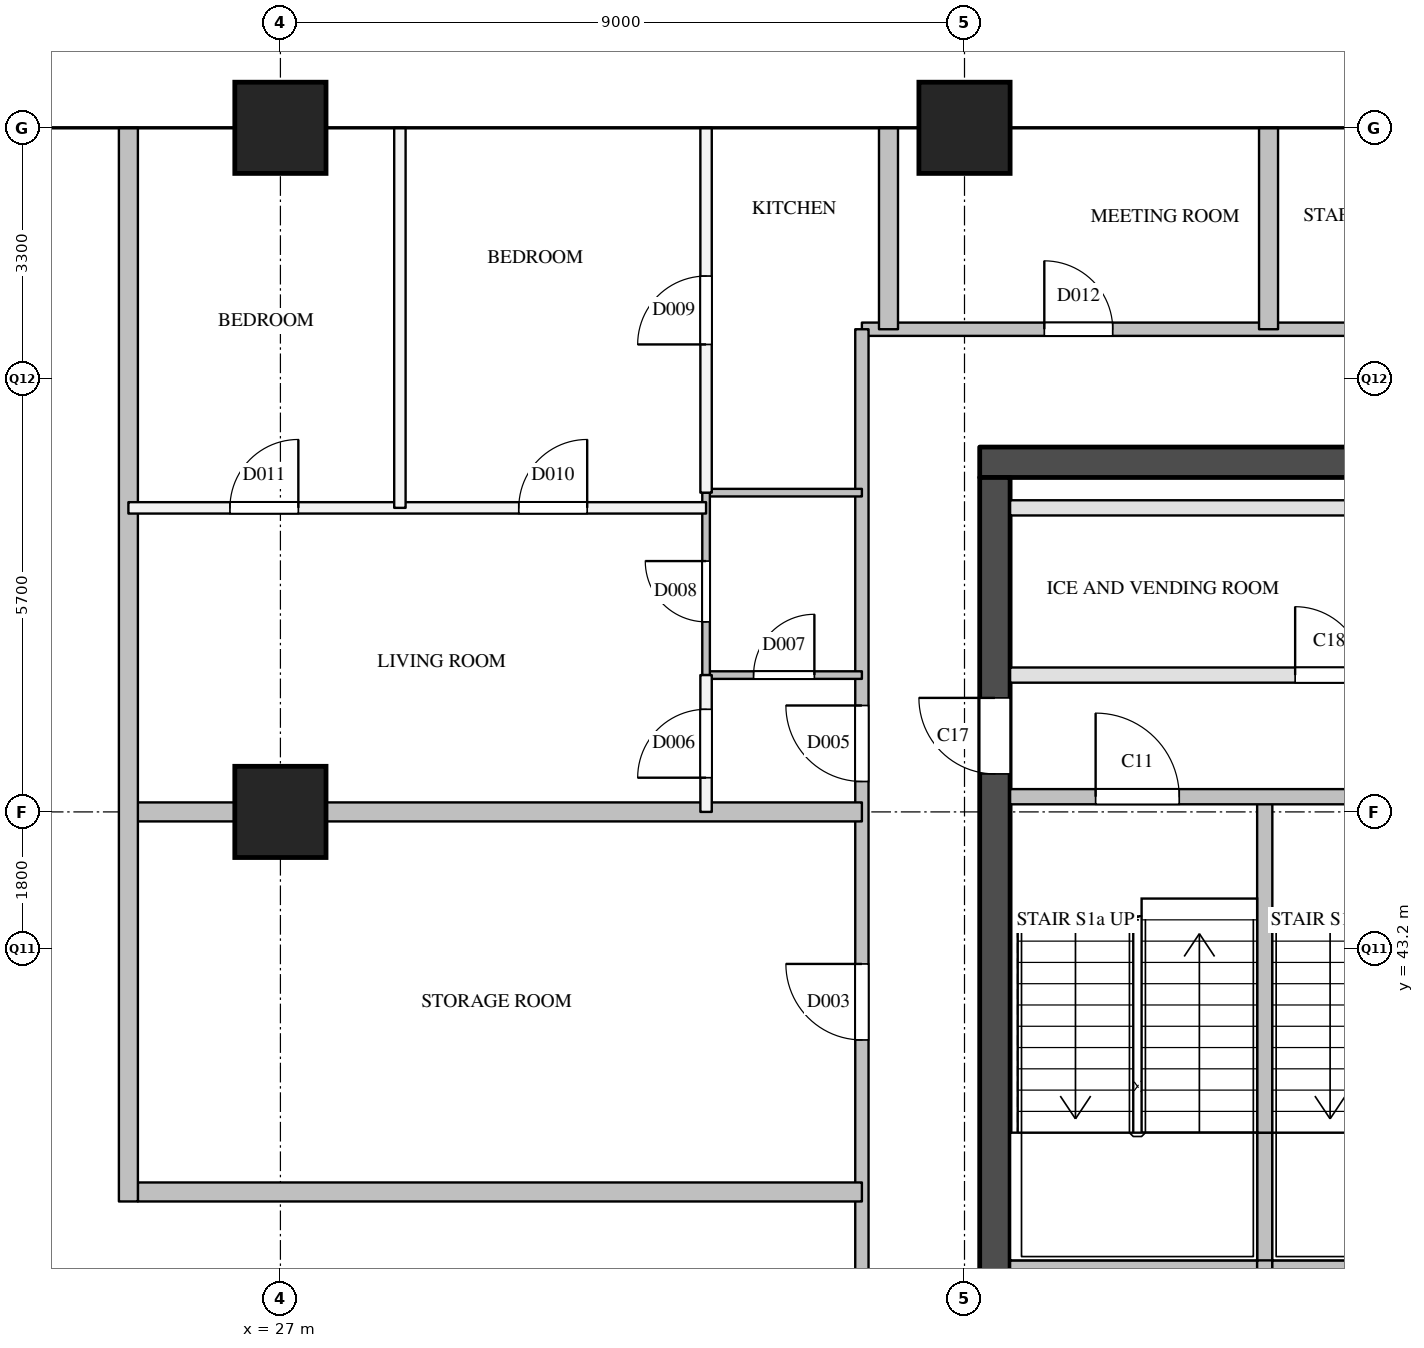
"""IFC4 building model, lengths in metres.
Left out: names, types, materials, properties, quantities, classifications, styles, units other than length and angle.
Written with IfcOpenShell. Run it as: python <this file> out.ifc"""

import sys

from ifc_helpers import new_model, si_unit, direction, frame, frame_2d, origin, origin_2d, place, context, subcontext, project, spatial, rectangle, extrude, element, fill, save


model = new_model("IFC4")
c1 = context("Model", 3, precision=1e-05, world=origin(), true_north=direction((0.0, 1.0)))
c2 = subcontext(c1, "Body", "Model", "MODEL_VIEW")
j1 = project(units=[si_unit("LENGTHUNIT", "METRE"), si_unit("PLANEANGLEUNIT", "RADIAN")], contexts=[c1])
p1 = place(None, origin())
s1 = spatial("IfcSite", under=j1, at=p1, CompositionType="ELEMENT")
p2 = place(p1, origin())
s2 = spatial("IfcBuilding", under=s1, at=p2, CompositionType="ELEMENT")
p3 = place(p2, frame((0.0, 0.0, 265.7)))
s3 = spatial("IfcBuildingStorey", under=s2, at=p3, CompositionType="ELEMENT", Elevation=265.7)
for number, where, z_axis, x_axis in (
    (1, (27.0, 45.0, 0.0), (0.0, 0.0, 1.0), (1.0, 0.0, 0.0)),
    (2, (27.0, 54.0, 0.0), (0.0, 0.0, 1.0), (1.0, 0.0, 0.0)),
    (3, (36.0, 54.0, 0.0), (0.0, 0.0, 1.0), (1.0, 0.0, 0.0)),
):
    element("IfcColumn", number, at=place(p3, frame(where, z_axis=z_axis, x_axis=x_axis)), inside=s3, PredefinedType="COLUMN", context=c2, shape_type="SweptSolid", body=[
        extrude(rectangle(XDim=1.2, YDim=1.2, at=origin_2d()), origin(), (0.0, 0.0, 1.0), 3.9),
    ])
p4 = place(p3, frame((36.2, 49.6, 0.0), z_axis=(0.0, 0.0, 1.0), x_axis=(1.0, 0.0, 0.0)))
e4 = element("IfcWall", 4, at=p4, inside=s3, PredefinedType="SHEAR", context=c2, shape_type="SweptSolid", body=[
    extrude(rectangle(XDim=12.0, YDim=0.4, at=frame_2d((6.0, 0.0))), origin(), (0.0, 0.0, 1.0), 3.6),
])
p5 = place(p3, frame((36.4, 29.1, 0.0), z_axis=(0.0, 0.0, 1.0), x_axis=(0.0, 1.0, 0.0)))
e5 = element("IfcWall", 5, at=p5, inside=s3, PredefinedType="SHEAR", context=c2, shape_type="SweptSolid", body=[
    extrude(rectangle(XDim=20.3, YDim=0.4, at=frame_2d((10.15, 0.0))), origin(), (0.0, 0.0, 1.0), 3.6),
])
p6 = place(p5, frame((3.6, 0.0, 0.0)))
e6 = element("IfcOpeningElement", 6, at=p6, cuts=e5, PredefinedType="OPENING", context=c2, shape_type="SweptSolid", body=[
    extrude(rectangle(XDim=1.8, YDim=2.1, at=frame_2d((0.9, 1.05))), frame((0.0, 0.21, 0.0), z_axis=(0.0, -1.0, 0.0), x_axis=(1.0, 0.0, 0.0)), (0.0, 0.0, 1.0), 0.42),
])
p7 = place(p5, frame((16.4, 0.0, 0.0)))
e7 = element("IfcOpeningElement", 7, at=p7, cuts=e5, PredefinedType="OPENING", context=c2, shape_type="SweptSolid", body=[
    extrude(rectangle(XDim=1.0, YDim=2.1, at=frame_2d((0.5, 1.05))), frame((0.0, 0.21, 0.0), z_axis=(0.0, -1.0, 0.0), x_axis=(1.0, 0.0, 0.0)), (0.0, 0.0, 1.0), 0.42),
])
p8 = place(p3, frame((39.95, 39.0, 0.0), z_axis=(0.0, 0.0, 1.0), x_axis=(0.0, 1.0, 0.0)))
e8 = element("IfcWall", 8, at=p8, inside=s3, PredefinedType="SOLIDWALL", context=c2, shape_type="SweptSolid", body=[
    extrude(rectangle(XDim=1.78, YDim=0.2, at=frame_2d((0.89, 0.0))), origin(), (0.0, 0.0, 1.0), 3.6),
])
p9 = place(p3, frame((39.95, 40.78, 0.0), z_axis=(0.0, 0.0, 1.0), x_axis=(0.0, 1.0, 0.0)))
e9 = element("IfcWall", 9, at=p9, inside=s3, PredefinedType="SOLIDWALL", context=c2, shape_type="SweptSolid", body=[
    extrude(rectangle(XDim=4.42, YDim=0.2, at=frame_2d((2.21, 0.0))), origin(), (0.0, 0.0, 1.0), 3.6),
])
p10 = place(p3, frame((36.6, 39.0, 0.0), z_axis=(0.0, 0.0, 1.0), x_axis=(1.0, 0.0, 0.0)))
e10 = element("IfcWall", 10, at=p10, inside=s3, PredefinedType="SOLIDWALL", context=c2, shape_type="SweptSolid", body=[
    extrude(rectangle(XDim=3.25, YDim=0.2, at=frame_2d((1.625, 0.0))), origin(), (0.0, 0.0, 1.0), 3.6),
])
p11 = place(p3, frame((39.85, 39.0, 0.0), z_axis=(0.0, 0.0, 1.0), x_axis=(1.0, 0.0, 0.0)))
e11 = element("IfcWall", 11, at=p11, inside=s3, PredefinedType="SOLIDWALL", context=c2, shape_type="SweptSolid", body=[
    extrude(rectangle(XDim=0.2, YDim=0.2, at=frame_2d((0.1, 0.0))), origin(), (0.0, 0.0, 1.0), 3.6),
])
p12 = place(p3, frame((40.05, 39.0, 0.0), z_axis=(0.0, 0.0, 1.0), x_axis=(1.0, 0.0, 0.0)))
e12 = element("IfcWall", 12, at=p12, inside=s3, PredefinedType="SOLIDWALL", context=c2, shape_type="SweptSolid", body=[
    extrude(rectangle(XDim=3.15, YDim=0.2, at=frame_2d((1.575, 0.0))), origin(), (0.0, 0.0, 1.0), 3.6),
])
p13 = place(p3, frame((36.6, 45.2, 0.0), z_axis=(0.0, 0.0, 1.0), x_axis=(1.0, 0.0, 0.0)))
e13 = element("IfcWall", 13, at=p13, inside=s3, PredefinedType="SOLIDWALL", context=c2, shape_type="SweptSolid", body=[
    extrude(rectangle(XDim=10.05, YDim=0.2, at=frame_2d((5.025, 0.0))), origin(), (0.0, 0.0, 1.0), 3.6),
])
p14 = place(p13, frame((1.125, 0.0, 0.0)))
e14 = element("IfcOpeningElement", 14, at=p14, cuts=e13, PredefinedType="OPENING", context=c2, shape_type="SweptSolid", body=[
    extrude(rectangle(XDim=1.1, YDim=2.1, at=frame_2d((0.55, 1.05))), frame((0.0, 0.11, 0.0), z_axis=(0.0, -1.0, 0.0), x_axis=(1.0, 0.0, 0.0)), (0.0, 0.0, 1.0), 0.22),
])
p15 = place(p13, frame((4.475, 0.0, 0.0)))
e15 = element("IfcOpeningElement", 15, at=p15, cuts=e13, PredefinedType="OPENING", context=c2, shape_type="SweptSolid", body=[
    extrude(rectangle(XDim=1.1, YDim=2.1, at=frame_2d((0.55, 1.05))), frame((0.0, 0.11, 0.0), z_axis=(0.0, -1.0, 0.0), x_axis=(1.0, 0.0, 0.0)), (0.0, 0.0, 1.0), 0.22),
])
p16 = place(p13, frame((7.825, 0.0, 0.0)))
e16 = element("IfcOpeningElement", 16, at=p16, cuts=e13, PredefinedType="OPENING", context=c2, shape_type="SweptSolid", body=[
    extrude(rectangle(XDim=1.1, YDim=2.1, at=frame_2d((0.55, 1.05))), frame((0.0, 0.11, 0.0), z_axis=(0.0, -1.0, 0.0), x_axis=(1.0, 0.0, 0.0)), (0.0, 0.0, 1.0), 0.22),
])
p17 = place(p3, frame((36.6, 46.8, 0.0), z_axis=(0.0, 0.0, 1.0), x_axis=(1.0, 0.0, 0.0)))
e17 = element("IfcWall", 17, at=p17, inside=s3, PredefinedType="PARTITIONING", context=c2, shape_type="SweptSolid", body=[
    extrude(rectangle(XDim=11.2, YDim=0.2, at=frame_2d((5.6, 0.0))), origin(), (0.0, 0.0, 1.0), 3.6),
])
p18 = place(p17, frame((3.75, 0.0, 0.0)))
e18 = element("IfcOpeningElement", 18, at=p18, cuts=e17, PredefinedType="OPENING", context=c2, shape_type="SweptSolid", body=[
    extrude(rectangle(XDim=0.9, YDim=2.1, at=frame_2d((0.45, 1.05))), frame((0.0, 0.11, 0.0), z_axis=(0.0, -1.0, 0.0), x_axis=(1.0, 0.0, 0.0)), (0.0, 0.0, 1.0), 0.22),
])
p19 = place(p17, frame((9.35, 0.0, 0.0)))
e19 = element("IfcOpeningElement", 19, at=p19, cuts=e17, PredefinedType="OPENING", context=c2, shape_type="SweptSolid", body=[
    extrude(rectangle(XDim=0.9, YDim=2.1, at=frame_2d((0.45, 1.05))), frame((0.0, 0.11, 0.0), z_axis=(0.0, -1.0, 0.0), x_axis=(1.0, 0.0, 0.0)), (0.0, 0.0, 1.0), 0.22),
])
p20 = place(p3, frame((36.6, 49.0, 0.0), z_axis=(0.0, 0.0, 1.0), x_axis=(1.0, 0.0, 0.0)))
e20 = element("IfcWall", 20, at=p20, inside=s3, PredefinedType="PARTITIONING", context=c2, shape_type="SweptSolid", body=[
    extrude(rectangle(XDim=11.2, YDim=0.2, at=frame_2d((5.6, 0.0))), origin(), (0.0, 0.0, 1.0), 3.6),
])
p21 = place(p3, frame((34.65, 51.35, 0.0), z_axis=(0.0, 0.0, 1.0), x_axis=(1.0, 0.0, 0.0)))
e21 = element("IfcWall", 21, at=p21, inside=s3, PredefinedType="PARTITIONING", context=c2, shape_type="SweptSolid", body=[
    extrude(rectangle(XDim=15.1, YDim=0.175, at=frame_2d((7.55, 0.0))), origin(), (0.0, 0.0, 1.0), 3.6),
])
p22 = place(p21, frame((2.4, 0.0, 0.0)))
e22 = element("IfcOpeningElement", 22, at=p22, cuts=e21, PredefinedType="OPENING", context=c2, shape_type="SweptSolid", body=[
    extrude(rectangle(XDim=0.9, YDim=2.1, at=frame_2d((0.45, 1.05))), frame((0.0, 0.097, 0.0), z_axis=(0.0, -1.0, 0.0), x_axis=(1.0, 0.0, 0.0)), (0.0, 0.0, 1.0), 0.195),
])
p23 = place(p21, frame((7.35, 0.0, 0.0)))
e23 = element("IfcOpeningElement", 23, at=p23, cuts=e21, PredefinedType="OPENING", context=c2, shape_type="SweptSolid", body=[
    extrude(rectangle(XDim=1.0, YDim=2.1, at=frame_2d((0.5, 1.05))), frame((0.0, 0.097, 0.0), z_axis=(0.0, -1.0, 0.0), x_axis=(1.0, 0.0, 0.0)), (0.0, 0.0, 1.0), 0.195),
])
p24 = place(p3, frame((34.65, 28.5, 0.0), z_axis=(0.0, 0.0, 1.0), x_axis=(0.0, 1.0, 0.0)))
e24 = element("IfcWall", 24, at=p24, inside=s3, PredefinedType="PARTITIONING", context=c2, shape_type="SweptSolid", body=[
    extrude(rectangle(XDim=22.85, YDim=0.175, at=frame_2d((11.425, 0.0))), origin(), (0.0, 0.0, 1.0), 3.6),
])
p25 = place(p24, frame((5.3, 0.0, 0.0)))
e25 = element("IfcOpeningElement", 25, at=p25, cuts=e24, PredefinedType="OPENING", context=c2, shape_type="SweptSolid", body=[
    extrude(rectangle(XDim=0.9, YDim=2.1, at=frame_2d((0.45, 1.05))), frame((0.0, 0.097, 0.0), z_axis=(0.0, -1.0, 0.0), x_axis=(1.0, 0.0, 0.0)), (0.0, 0.0, 1.0), 0.195),
])
p26 = place(p24, frame((13.5, 0.0, 0.0)))
e26 = element("IfcOpeningElement", 26, at=p26, cuts=e24, PredefinedType="OPENING", context=c2, shape_type="SweptSolid", body=[
    extrude(rectangle(XDim=1.0, YDim=2.1, at=frame_2d((0.5, 1.05))), frame((0.0, 0.097, 0.0), z_axis=(0.0, -1.0, 0.0), x_axis=(1.0, 0.0, 0.0)), (0.0, 0.0, 1.0), 0.195),
])
p27 = place(p24, frame((16.9, 0.0, 0.0)))
e27 = element("IfcOpeningElement", 27, at=p27, cuts=e24, PredefinedType="OPENING", context=c2, shape_type="SweptSolid", body=[
    extrude(rectangle(XDim=1.0, YDim=2.1, at=frame_2d((0.5, 1.05))), frame((0.0, 0.097, 0.0), z_axis=(0.0, -1.0, 0.0), x_axis=(1.0, 0.0, 0.0)), (0.0, 0.0, 1.0), 0.195),
])
p28 = place(p3, frame((25.0, 49.0, 0.0), z_axis=(0.0, 0.0, 1.0), x_axis=(1.0, 0.0, 0.0)))
e28 = element("IfcWall", 28, at=p28, inside=s3, PredefinedType="PARTITIONING", context=c2, shape_type="SweptSolid", body=[
    extrude(rectangle(XDim=7.6, YDim=0.15, at=frame_2d((3.8, 0.0))), origin(), (0.0, 0.0, 1.0), 2.6),
])
p29 = place(p28, frame((5.136, 0.0, 0.0)))
e29 = element("IfcOpeningElement", 29, at=p29, cuts=e28, PredefinedType="OPENING", context=c2, shape_type="SweptSolid", body=[
    extrude(rectangle(XDim=0.9, YDim=2.1, at=frame_2d((0.45, 1.05))), frame((0.0, 0.085, 0.0), z_axis=(0.0, -1.0, 0.0), x_axis=(1.0, 0.0, 0.0)), (0.0, 0.0, 1.0), 0.17),
])
p30 = place(p28, frame((1.336, 0.0, 0.0)))
e30 = element("IfcOpeningElement", 30, at=p30, cuts=e28, PredefinedType="OPENING", context=c2, shape_type="SweptSolid", body=[
    extrude(rectangle(XDim=0.9, YDim=2.1, at=frame_2d((0.45, 1.05))), frame((0.0, 0.085, 0.0), z_axis=(0.0, -1.0, 0.0), x_axis=(1.0, 0.0, 0.0)), (0.0, 0.0, 1.0), 0.17),
])
p31 = place(p3, frame((28.572, 49.0, 0.0), z_axis=(0.0, 0.0, 1.0), x_axis=(0.0, 1.0, 0.0)))
e31 = element("IfcWall", 31, at=p31, inside=s3, PredefinedType="PARTITIONING", context=c2, shape_type="SweptSolid", body=[
    extrude(rectangle(XDim=5.0, YDim=0.15, at=frame_2d((2.5, 0.0))), origin(), (0.0, 0.0, 1.0), 2.6),
])
p32 = place(p3, frame((32.6, 45.0, 0.0), z_axis=(0.0, 0.0, 1.0), x_axis=(0.0, 1.0, 0.0)))
e32 = element("IfcWall", 32, at=p32, inside=s3, PredefinedType="PARTITIONING", context=c2, shape_type="SweptSolid", body=[
    extrude(rectangle(XDim=1.8, YDim=0.15, at=frame_2d((0.9, 0.0))), origin(), (0.0, 0.0, 1.0), 3.6),
])
p33 = place(p32, frame((0.45, 0.0, 0.0)))
e33 = element("IfcOpeningElement", 33, at=p33, cuts=e32, PredefinedType="OPENING", context=c2, shape_type="SweptSolid", body=[
    extrude(rectangle(XDim=0.9, YDim=2.1, at=frame_2d((0.45, 1.05))), frame((0.0, 0.085, 0.0), z_axis=(0.0, -1.0, 0.0), x_axis=(1.0, 0.0, 0.0)), (0.0, 0.0, 1.0), 0.17),
])
p34 = place(p3, frame((32.6, 49.2, 0.0), z_axis=(0.0, 0.0, 1.0), x_axis=(0.0, 1.0, 0.0)))
e34 = element("IfcWall", 34, at=p34, inside=s3, PredefinedType="PARTITIONING", context=c2, shape_type="SweptSolid", body=[
    extrude(rectangle(XDim=4.8, YDim=0.15, at=frame_2d((2.4, 0.0))), origin(), (0.0, 0.0, 1.0), 2.6),
])
p35 = place(p34, frame((1.95, 0.0, 0.0)))
e35 = element("IfcOpeningElement", 35, at=p35, cuts=e34, PredefinedType="OPENING", context=c2, shape_type="SweptSolid", body=[
    extrude(rectangle(XDim=0.9, YDim=2.1, at=frame_2d((0.45, 1.05))), frame((0.0, 0.085, 0.0), z_axis=(0.0, -1.0, 0.0), x_axis=(1.0, 0.0, 0.0)), (0.0, 0.0, 1.0), 0.17),
])
p36 = place(p3, frame((25.125, 40.0, 0.0), z_axis=(0.0, 0.0, 1.0), x_axis=(1.0, 0.0, 0.0)))
e36 = element("IfcWall", 36, at=p36, inside=s3, PredefinedType="PARTITIONING", context=c2, shape_type="SweptSolid", body=[
    extrude(rectangle(XDim=9.525, YDim=0.25, at=frame_2d((4.762, 0.0))), origin(), (0.0, 0.0, 1.0), 2.6),
])
p37 = place(p3, frame((25.0, 45.0, 0.0), z_axis=(0.0, 0.0, 1.0), x_axis=(1.0, 0.0, 0.0)))
e37 = element("IfcWall", 37, at=p37, inside=s3, PredefinedType="PARTITIONING", context=c2, shape_type="SweptSolid", body=[
    extrude(rectangle(XDim=9.65, YDim=0.25, at=frame_2d((4.825, 0.0))), origin(), (0.0, 0.0, 1.0), 3.6),
])
p38 = place(p3, frame((25.0, 39.875, 0.0), z_axis=(0.0, 0.0, 1.0), x_axis=(0.0, 1.0, 0.0)))
e38 = element("IfcWall", 38, at=p38, inside=s3, PredefinedType="PARTITIONING", context=c2, shape_type="SweptSolid", body=[
    extrude(rectangle(XDim=14.125, YDim=0.25, at=frame_2d((7.062, 0.0))), origin(), (0.0, 0.0, 1.0), 2.6),
])
for number, where, z_axis, x_axis in (
    (39, (35.0, 51.35, 0.0), (0.0, 0.0, 1.0), (0.0, 1.0, 0.0)),
    (40, (40.0, 51.35, 0.0), (0.0, 0.0, 1.0), (0.0, 1.0, 0.0)),
):
    element("IfcWall", number, at=place(p3, frame(where, z_axis=z_axis, x_axis=x_axis)), inside=s3, PredefinedType="PARTITIONING", context=c2, shape_type="SweptSolid", body=[
        extrude(rectangle(XDim=2.65, YDim=0.25, at=frame_2d((1.325, 0.0))), origin(), (0.0, 0.0, 1.0), 2.6),
    ])
p39 = place(p3, frame((32.6, 46.8, 0.0), z_axis=(0.0, 0.0, 1.0), x_axis=(1.0, 0.0, 0.0)))
e41 = element("IfcWall", 41, at=p39, inside=s3, PredefinedType="PARTITIONING", context=c2, shape_type="SweptSolid", body=[
    extrude(rectangle(XDim=2.05, YDim=0.1, at=frame_2d((1.025, 0.0))), origin(), (0.0, 0.0, 1.0), 3.6),
])
p40 = place(p39, frame((0.625, 0.0, 0.0)))
e42 = element("IfcOpeningElement", 42, at=p40, cuts=e41, PredefinedType="OPENING", context=c2, shape_type="SweptSolid", body=[
    extrude(rectangle(XDim=0.8, YDim=2.1, at=frame_2d((0.4, 1.05))), frame((0.0, 0.06, 0.0), z_axis=(0.0, -1.0, 0.0), x_axis=(1.0, 0.0, 0.0)), (0.0, 0.0, 1.0), 0.12),
])
p41 = place(p3, frame((32.6, 49.2, 0.0), z_axis=(0.0, 0.0, 1.0), x_axis=(1.0, 0.0, 0.0)))
e43 = element("IfcWall", 43, at=p41, inside=s3, PredefinedType="PARTITIONING", context=c2, shape_type="SweptSolid", body=[
    extrude(rectangle(XDim=2.05, YDim=0.1, at=frame_2d((1.025, 0.0))), origin(), (0.0, 0.0, 1.0), 3.6),
])
p42 = place(p3, frame((32.6, 46.8, 0.0), z_axis=(0.0, 0.0, 1.0), x_axis=(0.0, 1.0, 0.0)))
e44 = element("IfcWall", 44, at=p42, inside=s3, PredefinedType="PARTITIONING", context=c2, shape_type="SweptSolid", body=[
    extrude(rectangle(XDim=2.4, YDim=0.1, at=frame_2d((1.2, 0.0))), origin(), (0.0, 0.0, 1.0), 3.6),
])
p43 = place(p42, frame((0.7, 0.0, 0.0)))
e45 = element("IfcOpeningElement", 45, at=p43, cuts=e44, PredefinedType="OPENING", context=c2, shape_type="SweptSolid", body=[
    extrude(rectangle(XDim=0.8, YDim=2.1, at=frame_2d((0.4, 1.05))), frame((0.0, 0.06, 0.0), z_axis=(0.0, -1.0, 0.0), x_axis=(1.0, 0.0, 0.0)), (0.0, 0.0, 1.0), 0.12),
])
p44 = place(p14, origin())
e46 = element("IfcDoor", 46, at=p44, inside=s3, OperationType="SINGLE_SWING_LEFT", PredefinedType="DOOR", context=c2, shape_type="SweptSolid", body=[
    extrude(rectangle(XDim=1.1, YDim=2.1, at=frame_2d((0.55, 1.05))), frame((0.0, 0.025, 0.0), z_axis=(0.0, -1.0, 0.0), x_axis=(1.0, 0.0, 0.0)), (0.0, 0.0, 1.0), 0.05),
])
fill(e14, e46)
p45 = place(p7, origin())
e47 = element("IfcDoor", 47, at=p45, inside=s3, OperationType="SINGLE_SWING_RIGHT", PredefinedType="DOOR", context=c2, shape_type="SweptSolid", body=[
    extrude(rectangle(XDim=1.0, YDim=2.1, at=frame_2d((0.5, 1.05))), frame((0.0, 0.025, 0.0), z_axis=(0.0, -1.0, 0.0), x_axis=(1.0, 0.0, 0.0)), (0.0, 0.0, 1.0), 0.05),
])
fill(e7, e47)
p46 = place(p18, origin())
e48 = element("IfcDoor", 48, at=p46, inside=s3, OperationType="SINGLE_SWING_LEFT", PredefinedType="DOOR", context=c2, shape_type="SweptSolid", body=[
    extrude(rectangle(XDim=0.9, YDim=2.1, at=frame_2d((0.45, 1.05))), frame((0.0, 0.025, 0.0), z_axis=(0.0, -1.0, 0.0), x_axis=(1.0, 0.0, 0.0)), (0.0, 0.0, 1.0), 0.05),
])
fill(e18, e48)
p47 = place(p26, origin())
e49 = element("IfcDoor", 49, at=p47, inside=s3, OperationType="SINGLE_SWING_RIGHT", PredefinedType="DOOR", context=c2, shape_type="SweptSolid", body=[
    extrude(rectangle(XDim=1.0, YDim=2.1, at=frame_2d((0.5, 1.05))), frame((0.0, 0.025, 0.0), z_axis=(0.0, -1.0, 0.0), x_axis=(1.0, 0.0, 0.0)), (0.0, 0.0, 1.0), 0.05),
])
fill(e26, e49)
p48 = place(p27, origin())
e50 = element("IfcDoor", 50, at=p48, inside=s3, OperationType="SINGLE_SWING_RIGHT", PredefinedType="DOOR", context=c2, shape_type="SweptSolid", body=[
    extrude(rectangle(XDim=1.0, YDim=2.1, at=frame_2d((0.5, 1.05))), frame((0.0, 0.025, 0.0), z_axis=(0.0, -1.0, 0.0), x_axis=(1.0, 0.0, 0.0)), (0.0, 0.0, 1.0), 0.05),
])
fill(e27, e50)
p49 = place(p33, origin())
e51 = element("IfcDoor", 51, at=p49, inside=s3, OperationType="SINGLE_SWING_LEFT", PredefinedType="DOOR", context=c2, shape_type="SweptSolid", body=[
    extrude(rectangle(XDim=0.9, YDim=2.1, at=frame_2d((0.45, 1.05))), frame((0.0, 0.025, 0.0), z_axis=(0.0, -1.0, 0.0), x_axis=(1.0, 0.0, 0.0)), (0.0, 0.0, 1.0), 0.05),
])
fill(e33, e51)
p50 = place(p40, origin())
e52 = element("IfcDoor", 52, at=p50, inside=s3, OperationType="SINGLE_SWING_RIGHT", PredefinedType="DOOR", context=c2, shape_type="SweptSolid", body=[
    extrude(rectangle(XDim=0.8, YDim=2.1, at=frame_2d((0.4, 1.05))), frame((0.0, 0.025, 0.0), z_axis=(0.0, -1.0, 0.0), x_axis=(1.0, 0.0, 0.0)), (0.0, 0.0, 1.0), 0.05),
])
fill(e42, e52)
p51 = place(p43, origin())
e53 = element("IfcDoor", 53, at=p51, inside=s3, OperationType="SINGLE_SWING_RIGHT", PredefinedType="DOOR", context=c2, shape_type="SweptSolid", body=[
    extrude(rectangle(XDim=0.8, YDim=2.1, at=frame_2d((0.4, 1.05))), frame((0.0, 0.025, 0.0), z_axis=(0.0, -1.0, 0.0), x_axis=(1.0, 0.0, 0.0)), (0.0, 0.0, 1.0), 0.05),
])
fill(e45, e53)
p52 = place(p35, origin())
e54 = element("IfcDoor", 54, at=p52, inside=s3, OperationType="SINGLE_SWING_LEFT", PredefinedType="DOOR", context=c2, shape_type="SweptSolid", body=[
    extrude(rectangle(XDim=0.9, YDim=2.1, at=frame_2d((0.45, 1.05))), frame((0.0, 0.025, 0.0), z_axis=(0.0, -1.0, 0.0), x_axis=(1.0, 0.0, 0.0)), (0.0, 0.0, 1.0), 0.05),
])
fill(e35, e54)
p53 = place(p29, origin())
e55 = element("IfcDoor", 55, at=p53, inside=s3, OperationType="SINGLE_SWING_RIGHT", PredefinedType="DOOR", context=c2, shape_type="SweptSolid", body=[
    extrude(rectangle(XDim=0.9, YDim=2.1, at=frame_2d((0.45, 1.05))), frame((0.0, 0.025, 0.0), z_axis=(0.0, -1.0, 0.0), x_axis=(1.0, 0.0, 0.0)), (0.0, 0.0, 1.0), 0.05),
])
fill(e29, e55)
p54 = place(p30, origin())
e56 = element("IfcDoor", 56, at=p54, inside=s3, OperationType="SINGLE_SWING_RIGHT", PredefinedType="DOOR", context=c2, shape_type="SweptSolid", body=[
    extrude(rectangle(XDim=0.9, YDim=2.1, at=frame_2d((0.45, 1.05))), frame((0.0, 0.025, 0.0), z_axis=(0.0, -1.0, 0.0), x_axis=(1.0, 0.0, 0.0)), (0.0, 0.0, 1.0), 0.05),
])
fill(e30, e56)
p55 = place(p22, origin())
e57 = element("IfcDoor", 57, at=p55, inside=s3, OperationType="SINGLE_SWING_LEFT", PredefinedType="DOOR", context=c2, shape_type="SweptSolid", body=[
    extrude(rectangle(XDim=0.9, YDim=2.1, at=frame_2d((0.45, 1.05))), frame((0.0, 0.025, 0.0), z_axis=(0.0, -1.0, 0.0), x_axis=(1.0, 0.0, 0.0)), (0.0, 0.0, 1.0), 0.05),
])
fill(e22, e57)
save(model, sys.argv[1])
